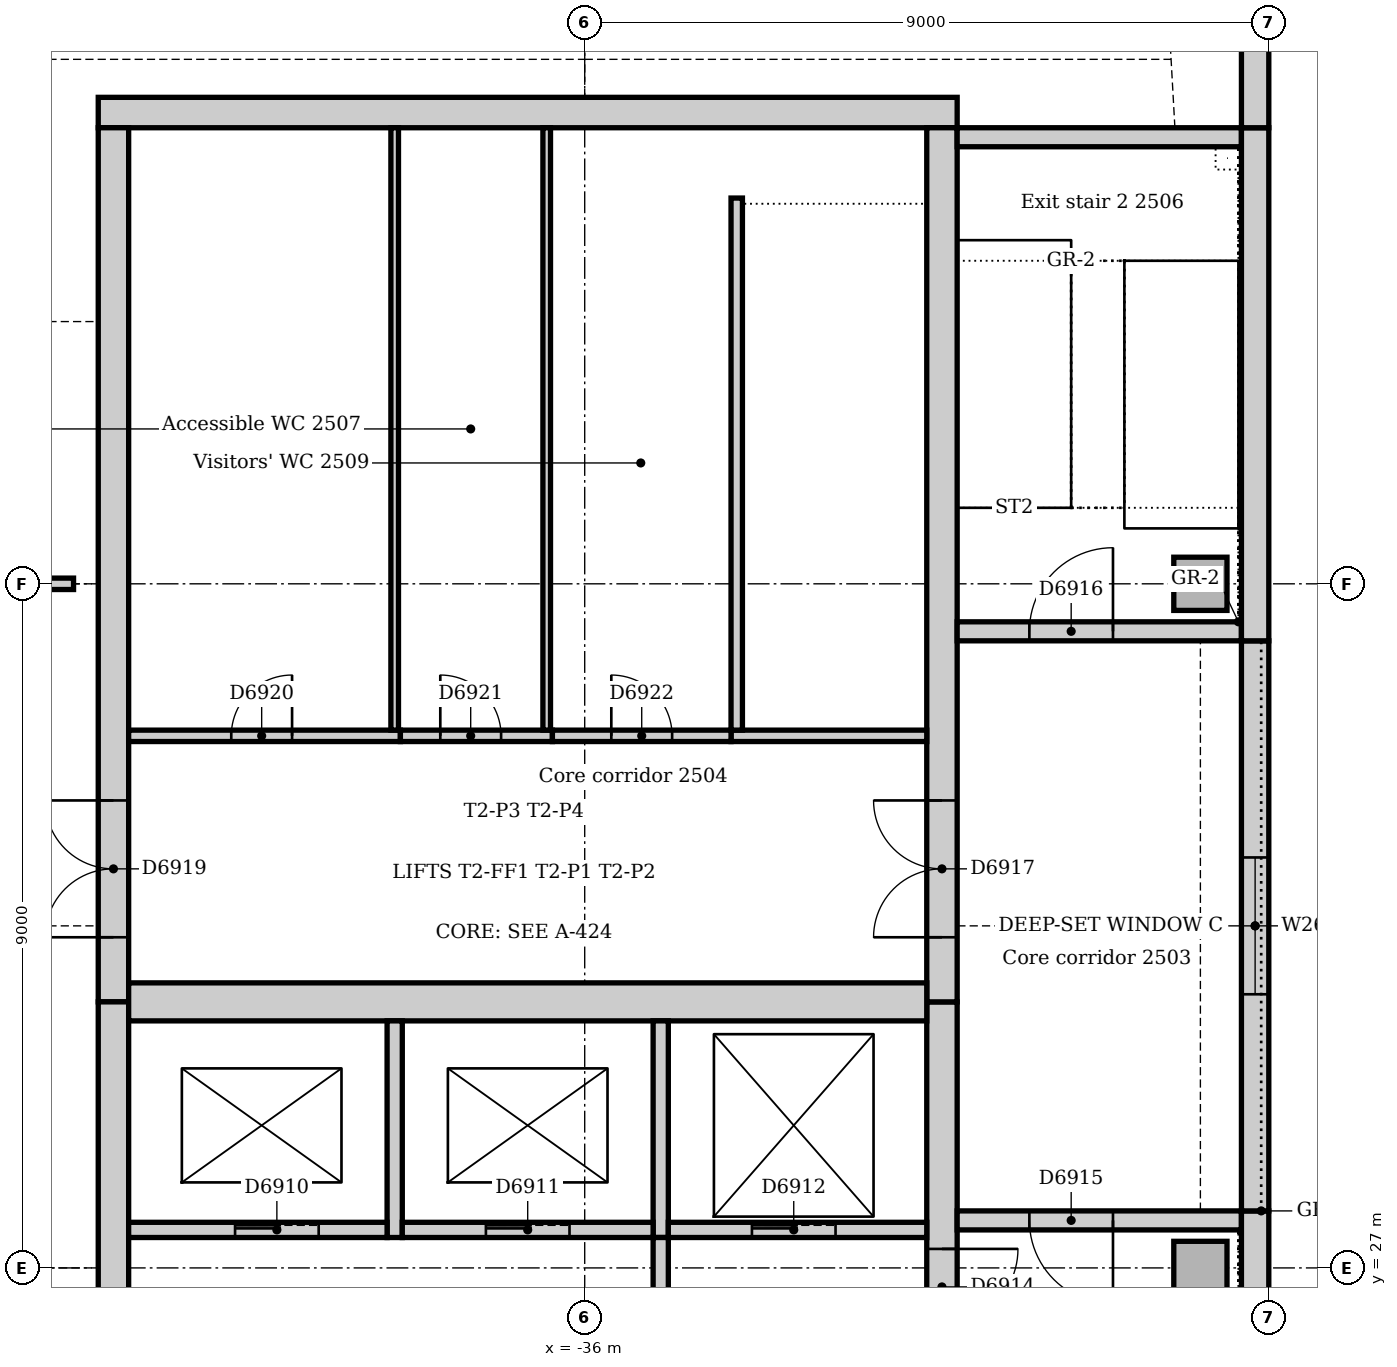
"""IFC4 building model, lengths in metres.
Left out: names, types, materials, properties, quantities, classifications, styles, units other than length and angle.
Written with IfcOpenShell. Run it as: python <this file> out.ifc"""

import sys

from ifc_helpers import new_model, si_unit, direction, frame, frame_2d, origin, origin_2d, place, context, subcontext, project, spatial, rectangle, extrude, element, fill, save


model = new_model("IFC4")
c1 = context("Model", 3, precision=1e-05, world=origin(), true_north=direction((0.0, 1.0)))
c2 = subcontext(c1, "Body", "Model", "MODEL_VIEW")
j1 = project(units=[si_unit("LENGTHUNIT", "METRE"), si_unit("PLANEANGLEUNIT", "RADIAN")], contexts=[c1])
p1 = place(None, origin())
s1 = spatial("IfcSite", under=j1, at=p1, CompositionType="ELEMENT")
p2 = place(p1, origin())
s2 = spatial("IfcBuilding", under=s1, at=p2, CompositionType="ELEMENT")
p3 = place(p2, frame((0.0, 0.0, 108.0)))
s3 = spatial("IfcBuildingStorey", under=s2, at=p3, CompositionType="ELEMENT", Elevation=108.0)
p4 = place(p3, frame((-31.1, 42.2, 0.0), z_axis=(0.0, 0.0, 1.0), x_axis=(-1.0, 0.0, 0.0)))
e1 = element("IfcWall", 1, at=p4, inside=s3, PredefinedType="SOLIDWALL", context=c2, shape_type="SweptSolid", body=[
    extrude(rectangle(XDim=11.3, YDim=0.4, at=frame_2d((5.65, 0.0))), origin(), (0.0, 0.0, 1.0), 4.0),
])
p5 = place(p3, frame((-31.3, 21.0, 0.0), z_axis=(0.0, 0.0, 1.0), x_axis=(0.0, 1.0, 0.0)))
e2 = element("IfcWall", 2, at=p5, inside=s3, PredefinedType="SOLIDWALL", context=c2, shape_type="SweptSolid", body=[
    extrude(rectangle(XDim=9.5, YDim=0.4, at=frame_2d((4.75, 0.0))), origin(), (0.0, 0.0, 1.0), 4.0),
])
p6 = place(p5, frame((5.25, 0.0, 0.0)))
e3 = element("IfcOpeningElement", 3, at=p6, cuts=e2, PredefinedType="OPENING", context=c2, shape_type="SweptSolid", body=[
    extrude(rectangle(XDim=1.0, YDim=2.1, at=frame_2d((0.5, 1.05))), frame((0.0, 0.21, 0.0), z_axis=(0.0, -1.0, 0.0), x_axis=(1.0, 0.0, 0.0)), (0.0, 0.0, 1.0), 0.42),
])
p7 = place(p3, frame((-31.3, 30.5, 0.0), z_axis=(0.0, 0.0, 1.0), x_axis=(0.0, 1.0, 0.0)))
e4 = element("IfcWall", 4, at=p7, inside=s3, PredefinedType="SOLIDWALL", context=c2, shape_type="SweptSolid", body=[
    extrude(rectangle(XDim=11.5, YDim=0.4, at=frame_2d((5.75, 0.0))), origin(), (0.0, 0.0, 1.0), 4.0),
])
p8 = place(p7, frame((0.85, 0.0, 0.0)))
e5 = element("IfcOpeningElement", 5, at=p8, cuts=e4, PredefinedType="OPENING", context=c2, shape_type="SweptSolid", body=[
    extrude(rectangle(XDim=1.8, YDim=2.1, at=frame_2d((0.9, 1.05))), frame((0.0, 0.21, 0.0), z_axis=(0.0, -1.0, 0.0), x_axis=(1.0, 0.0, 0.0)), (0.0, 0.0, 1.0), 0.42),
])
p9 = place(p3, frame((-42.2, 42.0, 0.0), z_axis=(0.0, 0.0, 1.0), x_axis=(0.0, -1.0, 0.0)))
e6 = element("IfcWall", 6, at=p9, inside=s3, PredefinedType="SOLIDWALL", context=c2, shape_type="SweptSolid", body=[
    extrude(rectangle(XDim=11.5, YDim=0.4, at=frame_2d((5.75, 0.0))), origin(), (0.0, 0.0, 1.0), 4.0),
])
p10 = place(p9, frame((8.85, 0.0, 0.0)))
e7 = element("IfcOpeningElement", 7, at=p10, cuts=e6, PredefinedType="OPENING", context=c2, shape_type="SweptSolid", body=[
    extrude(rectangle(XDim=1.8, YDim=2.1, at=frame_2d((0.9, 1.05))), frame((0.0, 0.21, 0.0), z_axis=(0.0, -1.0, 0.0), x_axis=(1.0, 0.0, 0.0)), (0.0, 0.0, 1.0), 0.42),
])
p11 = place(p3, frame((-42.2, 30.5, 0.0), z_axis=(0.0, 0.0, 1.0), x_axis=(0.0, -1.0, 0.0)))
e8 = element("IfcWall", 8, at=p11, inside=s3, PredefinedType="SOLIDWALL", context=c2, shape_type="SweptSolid", body=[
    extrude(rectangle(XDim=9.5, YDim=0.4, at=frame_2d((4.75, 0.0))), origin(), (0.0, 0.0, 1.0), 4.0),
])
p12 = place(p11, frame((3.85, 0.0, 0.0)))
e9 = element("IfcOpeningElement", 9, at=p12, cuts=e8, PredefinedType="OPENING", context=c2, shape_type="SweptSolid", body=[
    extrude(rectangle(XDim=1.8, YDim=2.1, at=frame_2d((0.9, 1.05))), frame((0.0, 0.21, 0.0), z_axis=(0.0, -1.0, 0.0), x_axis=(1.0, 0.0, 0.0)), (0.0, 0.0, 1.0), 0.42),
])
p13 = place(p3, frame((-42.0, 30.5, 0.0), z_axis=(0.0, 0.0, 1.0), x_axis=(1.0, 0.0, 0.0)))
e10 = element("IfcWall", 10, at=p13, inside=s3, PredefinedType="SOLIDWALL", context=c2, shape_type="SweptSolid", body=[
    extrude(rectangle(XDim=10.5, YDim=0.5, at=frame_2d((5.25, 0.0))), origin(), (0.0, 0.0, 1.0), 4.0),
])
p14 = place(p3, frame((-27.36, 27.625, 0.0), z_axis=(0.0, 0.0, 1.0), x_axis=(-1.0, 0.0, 0.0)))
e11 = element("IfcWall", 11, at=p14, inside=s3, PredefinedType="SOLIDWALL", context=c2, shape_type="SweptSolid", body=[
    extrude(rectangle(XDim=3.74, YDim=0.25, at=frame_2d((1.87, 0.0))), origin(), (0.0, 0.0, 1.0), 4.0),
])
p15 = place(p14, frame((1.69, 0.0, 0.0)))
e12 = element("IfcOpeningElement", 12, at=p15, cuts=e11, PredefinedType="OPENING", context=c2, shape_type="SweptSolid", body=[
    extrude(rectangle(XDim=1.1, YDim=2.1, at=frame_2d((0.55, 1.05))), frame((0.0, 0.135, 0.0), z_axis=(0.0, -1.0, 0.0), x_axis=(1.0, 0.0, 0.0)), (0.0, 0.0, 1.0), 0.27),
])
p16 = place(p3, frame((-31.1, 35.375, 0.0), z_axis=(0.0, 0.0, 1.0), x_axis=(1.0, 0.0, 0.0)))
e13 = element("IfcWall", 13, at=p16, inside=s3, PredefinedType="SOLIDWALL", context=c2, shape_type="SweptSolid", body=[
    extrude(rectangle(XDim=3.74, YDim=0.25, at=frame_2d((1.87, 0.0))), origin(), (0.0, 0.0, 1.0), 4.0),
])
p17 = place(p16, frame((0.95, 0.0, 0.0)))
e14 = element("IfcOpeningElement", 14, at=p17, cuts=e13, PredefinedType="OPENING", context=c2, shape_type="SweptSolid", body=[
    extrude(rectangle(XDim=1.1, YDim=2.1, at=frame_2d((0.55, 1.05))), frame((0.0, 0.135, 0.0), z_axis=(0.0, -1.0, 0.0), x_axis=(1.0, 0.0, 0.0)), (0.0, 0.0, 1.0), 0.27),
])
p18 = place(p3, frame((-27.36, 41.875, 0.0), z_axis=(0.0, 0.0, 1.0), x_axis=(-1.0, 0.0, 0.0)))
e15 = element("IfcWall", 15, at=p18, inside=s3, PredefinedType="SOLIDWALL", context=c2, shape_type="SweptSolid", body=[
    extrude(rectangle(XDim=3.74, YDim=0.25, at=frame_2d((1.87, 0.0))), origin(), (0.0, 0.0, 1.0), 4.0),
])
for number, where, z_axis, x_axis in (
    (16, (-27.9, 27.0, 0.0), (0.0, 0.0, 1.0), (1.0, 0.0, 0.0)),
    (17, (-27.9, 36.0, 0.0), (0.0, 0.0, 1.0), (1.0, 0.0, 0.0)),
):
    element("IfcColumn", number, at=place(p3, frame(where, z_axis=z_axis, x_axis=x_axis)), inside=s3, PredefinedType="COLUMN", context=c2, shape_type="SweptSolid", body=[
        extrude(rectangle(XDim=0.7, YDim=0.7, at=origin_2d()), origin(), (0.0, 0.0, 1.0), 4.0),
    ])
p19 = place(p3, frame((-27.18, 21.0, 0.0), z_axis=(0.0, 0.0, 1.0), x_axis=(0.0, 1.0, 0.0)))
e18 = element("IfcWall", 18, at=p19, inside=s3, PredefinedType="STANDARD", context=c2, shape_type="SweptSolid", body=[
    extrude(rectangle(XDim=6.75, YDim=0.36, at=frame_2d((3.375, 0.0))), origin(), (0.0, 0.0, 1.0), 3.85),
])
p20 = place(p3, frame((-27.18, 27.75, 0.0), z_axis=(0.0, 0.0, 1.0), x_axis=(0.0, 1.0, 0.0)))
e19 = element("IfcWall", 19, at=p20, inside=s3, PredefinedType="STANDARD", context=c2, shape_type="SweptSolid", body=[
    extrude(rectangle(XDim=7.5, YDim=0.36, at=frame_2d((3.75, 0.0))), origin(), (0.0, 0.0, 1.0), 3.85),
])
p21 = place(p20, frame((2.85, 0.0, 1.2)))
e20 = element("IfcOpeningElement", 20, at=p21, cuts=e19, PredefinedType="OPENING", context=c2, shape_type="SweptSolid", body=[
    extrude(rectangle(XDim=1.8, YDim=1.2, at=frame_2d((0.9, 0.6))), frame((0.0, 0.19, 0.0), z_axis=(0.0, -1.0, 0.0), x_axis=(1.0, 0.0, 0.0)), (0.0, 0.0, 1.0), 0.38),
])
p22 = place(p3, frame((-27.18, 35.25, 0.0), z_axis=(0.0, 0.0, 1.0), x_axis=(0.0, 1.0, 0.0)))
e21 = element("IfcWall", 21, at=p22, inside=s3, PredefinedType="STANDARD", context=c2, shape_type="SweptSolid", body=[
    extrude(rectangle(XDim=6.75, YDim=0.36, at=frame_2d((3.375, 0.0))), origin(), (0.0, 0.0, 1.0), 3.85),
])
p23 = place(p3, frame((-27.18, 42.0, 0.0), z_axis=(0.0, 0.0, 1.0), x_axis=(0.0, 1.0, 0.0)))
e22 = element("IfcWall", 22, at=p23, inside=s3, PredefinedType="STANDARD", context=c2, shape_type="SweptSolid", body=[
    extrude(rectangle(XDim=3.257, YDim=0.36, at=frame_2d((1.629, 0.0))), origin(), (0.0, 0.0, 1.0), 3.85),
])
p24 = place(p3, frame((-38.5, 27.4, 0.0), z_axis=(0.0, 0.0, 1.0), x_axis=(0.0, 1.0, 0.0)))
e23 = element("IfcWall", 23, at=p24, inside=s3, PredefinedType="SOLIDWALL", context=c2, shape_type="SweptSolid", body=[
    extrude(rectangle(XDim=2.85, YDim=0.2, at=frame_2d((1.425, 0.0))), origin(), (0.0, 0.0, 1.0), 4.0),
])
p25 = place(p3, frame((-42.0, 27.5, 0.0), z_axis=(0.0, 0.0, 1.0), x_axis=(1.0, 0.0, 0.0)))
e24 = element("IfcWall", 24, at=p25, inside=s3, PredefinedType="SOLIDWALL", context=c2, shape_type="SweptSolid", body=[
    extrude(rectangle(XDim=3.4, YDim=0.2, at=frame_2d((1.7, 0.0))), origin(), (0.0, 0.0, 1.0), 4.0),
])
p26 = place(p25, frame((1.4, 0.0, 0.0)))
e25 = element("IfcOpeningElement", 25, at=p26, cuts=e24, PredefinedType="OPENING", context=c2, shape_type="SweptSolid", body=[
    extrude(rectangle(XDim=1.1, YDim=2.1, at=frame_2d((0.55, 1.05))), frame((0.0, 0.11, 0.0), z_axis=(0.0, -1.0, 0.0), x_axis=(1.0, 0.0, 0.0)), (0.0, 0.0, 1.0), 0.22),
])
p27 = place(p3, frame((-35.0, 27.4, 0.0), z_axis=(0.0, 0.0, 1.0), x_axis=(0.0, 1.0, 0.0)))
e26 = element("IfcWall", 26, at=p27, inside=s3, PredefinedType="SOLIDWALL", context=c2, shape_type="SweptSolid", body=[
    extrude(rectangle(XDim=2.85, YDim=0.2, at=frame_2d((1.425, 0.0))), origin(), (0.0, 0.0, 1.0), 4.0),
])
p28 = place(p3, frame((-38.4, 27.5, 0.0), z_axis=(0.0, 0.0, 1.0), x_axis=(1.0, 0.0, 0.0)))
e27 = element("IfcWall", 27, at=p28, inside=s3, PredefinedType="SOLIDWALL", context=c2, shape_type="SweptSolid", body=[
    extrude(rectangle(XDim=3.3, YDim=0.2, at=frame_2d((1.65, 0.0))), origin(), (0.0, 0.0, 1.0), 4.0),
])
p29 = place(p28, frame((1.1, 0.0, 0.0)))
e28 = element("IfcOpeningElement", 28, at=p29, cuts=e27, PredefinedType="OPENING", context=c2, shape_type="SweptSolid", body=[
    extrude(rectangle(XDim=1.1, YDim=2.1, at=frame_2d((0.55, 1.05))), frame((0.0, 0.11, 0.0), z_axis=(0.0, -1.0, 0.0), x_axis=(1.0, 0.0, 0.0)), (0.0, 0.0, 1.0), 0.22),
])
p30 = place(p3, frame((-34.9, 27.5, 0.0), z_axis=(0.0, 0.0, 1.0), x_axis=(1.0, 0.0, 0.0)))
e29 = element("IfcWall", 29, at=p30, inside=s3, PredefinedType="SOLIDWALL", context=c2, shape_type="SweptSolid", body=[
    extrude(rectangle(XDim=3.4, YDim=0.2, at=frame_2d((1.7, 0.0))), origin(), (0.0, 0.0, 1.0), 4.0),
])
p31 = place(p30, frame((1.1, 0.0, 0.0)))
e30 = element("IfcOpeningElement", 30, at=p31, cuts=e29, PredefinedType="OPENING", context=c2, shape_type="SweptSolid", body=[
    extrude(rectangle(XDim=1.1, YDim=2.1, at=frame_2d((0.55, 1.05))), frame((0.0, 0.11, 0.0), z_axis=(0.0, -1.0, 0.0), x_axis=(1.0, 0.0, 0.0)), (0.0, 0.0, 1.0), 0.22),
])
p32 = place(p3, frame((-35.0, 24.1, 0.0), z_axis=(0.0, 0.0, 1.0), x_axis=(0.0, 1.0, 0.0)))
e31 = element("IfcWall", 31, at=p32, inside=s3, PredefinedType="SOLIDWALL", context=c2, shape_type="SweptSolid", body=[
    extrude(rectangle(XDim=3.3, YDim=0.2, at=frame_2d((1.65, 0.0))), origin(), (0.0, 0.0, 1.0), 4.0),
])
p33 = place(p32, frame((1.15, 0.0, 0.0)))
e32 = element("IfcOpeningElement", 32, at=p33, cuts=e31, PredefinedType="OPENING", context=c2, shape_type="SweptSolid", body=[
    extrude(rectangle(XDim=1.0, YDim=2.1, at=frame_2d((0.5, 1.05))), frame((0.0, 0.11, 0.0), z_axis=(0.0, -1.0, 0.0), x_axis=(1.0, 0.0, 0.0)), (0.0, 0.0, 1.0), 0.22),
])
p34 = place(p3, frame((-34.075, 34.0, 0.0), z_axis=(0.0, 0.0, 1.0), x_axis=(1.0, 0.0, 0.0)))
e33 = element("IfcWall", 33, at=p34, inside=s3, PredefinedType="SOLIDWALL", context=c2, shape_type="SweptSolid", body=[
    extrude(rectangle(XDim=2.575, YDim=0.15, at=frame_2d((1.288, 0.0))), origin(), (0.0, 0.0, 1.0), 4.0),
])
p35 = place(p3, frame((-34.0, 41.075, 0.0), z_axis=(0.0, 0.0, 1.0), x_axis=(0.0, -1.0, 0.0)))
e34 = element("IfcWall", 34, at=p35, inside=s3, PredefinedType="SOLIDWALL", context=c2, shape_type="SweptSolid", body=[
    extrude(rectangle(XDim=7.0, YDim=0.15, at=frame_2d((3.5, 0.0))), origin(), (0.0, 0.0, 1.0), 4.0),
])
p36 = place(p3, frame((-38.425, 34.0, 0.0), z_axis=(0.0, 0.0, 1.0), x_axis=(-1.0, 0.0, 0.0)))
e35 = element("IfcWall", 35, at=p36, inside=s3, PredefinedType="PARTITIONING", context=c2, shape_type="SweptSolid", body=[
    extrude(rectangle(XDim=3.575, YDim=0.15, at=frame_2d((1.788, 0.0))), origin(), (0.0, 0.0, 1.0), 3.85),
])
p37 = place(p36, frame((1.425, 0.0, 0.0)))
e36 = element("IfcOpeningElement", 36, at=p37, cuts=e35, PredefinedType="OPENING", context=c2, shape_type="SweptSolid", body=[
    extrude(rectangle(XDim=0.8, YDim=2.1, at=frame_2d((0.4, 1.05))), frame((0.0, 0.085, 0.0), z_axis=(0.0, -1.0, 0.0), x_axis=(1.0, 0.0, 0.0)), (0.0, 0.0, 1.0), 0.17),
])
p38 = place(p3, frame((-36.425, 34.0, 0.0), z_axis=(0.0, 0.0, 1.0), x_axis=(-1.0, 0.0, 0.0)))
e37 = element("IfcWall", 37, at=p38, inside=s3, PredefinedType="PARTITIONING", context=c2, shape_type="SweptSolid", body=[
    extrude(rectangle(XDim=2.0, YDim=0.15, at=frame_2d((1.0, 0.0))), origin(), (0.0, 0.0, 1.0), 3.85),
])
p39 = place(p38, frame((0.675, 0.0, 0.0)))
e38 = element("IfcOpeningElement", 38, at=p39, cuts=e37, PredefinedType="OPENING", context=c2, shape_type="SweptSolid", body=[
    extrude(rectangle(XDim=0.8, YDim=2.1, at=frame_2d((0.4, 1.05))), frame((0.0, 0.085, 0.0), z_axis=(0.0, -1.0, 0.0), x_axis=(1.0, 0.0, 0.0)), (0.0, 0.0, 1.0), 0.17),
])
p40 = place(p3, frame((-34.075, 34.0, 0.0), z_axis=(0.0, 0.0, 1.0), x_axis=(-1.0, 0.0, 0.0)))
e39 = element("IfcWall", 39, at=p40, inside=s3, PredefinedType="PARTITIONING", context=c2, shape_type="SweptSolid", body=[
    extrude(rectangle(XDim=2.35, YDim=0.15, at=frame_2d((1.175, 0.0))), origin(), (0.0, 0.0, 1.0), 3.85),
])
p41 = place(p40, frame((0.775, 0.0, 0.0)))
e40 = element("IfcOpeningElement", 40, at=p41, cuts=e39, PredefinedType="OPENING", context=c2, shape_type="SweptSolid", body=[
    extrude(rectangle(XDim=0.8, YDim=2.1, at=frame_2d((0.4, 1.05))), frame((0.0, 0.085, 0.0), z_axis=(0.0, -1.0, 0.0), x_axis=(1.0, 0.0, 0.0)), (0.0, 0.0, 1.0), 0.17),
])
for number, where, z_axis, x_axis in (
    (41, (-38.5, 34.075, 0.0), (0.0, 0.0, 1.0), (0.0, 1.0, 0.0)),
    (42, (-36.5, 34.075, 0.0), (0.0, 0.0, 1.0), (0.0, 1.0, 0.0)),
):
    element("IfcWall", number, at=place(p3, frame(where, z_axis=z_axis, x_axis=x_axis)), inside=s3, PredefinedType="PARTITIONING", context=c2, shape_type="SweptSolid", body=[
        extrude(rectangle(XDim=7.925, YDim=0.1, at=frame_2d((3.962, 0.0))), origin(), (0.0, 0.0, 1.0), 3.85),
    ])
p42 = place(p3, frame((-44.7, 36.0, 0.0), z_axis=(0.0, 0.0, 1.0), x_axis=(1.0, 0.0, 0.0)))
e43 = element("IfcWall", 43, at=p42, inside=s3, PredefinedType="PARTITIONING", context=c2, shape_type="SweptSolid", body=[
    extrude(rectangle(XDim=1.975, YDim=0.15, at=frame_2d((0.988, 0.0))), origin(), (0.0, 0.0, 1.0), 3.602),
])
p43 = place(p42, frame((0.55, 0.0, 0.0)))
e44 = element("IfcOpeningElement", 44, at=p43, cuts=e43, PredefinedType="OPENING", context=c2, shape_type="SweptSolid", body=[
    extrude(rectangle(XDim=0.9, YDim=2.1, at=frame_2d((0.45, 1.05))), frame((0.0, 0.085, 0.0), z_axis=(0.0, -1.0, 0.0), x_axis=(1.0, 0.0, 0.0)), (0.0, 0.0, 1.0), 0.17),
])
p44 = place(p21, origin())
e45 = element("IfcWindow", 45, at=p44, inside=s3, PartitioningType="SINGLE_PANEL", PredefinedType="WINDOW", context=c2, shape_type="SweptSolid", body=[
    extrude(rectangle(XDim=1.8, YDim=1.2, at=frame_2d((0.9, 0.6))), frame((0.0, 0.13, 0.0), z_axis=(0.0, -1.0, 0.0), x_axis=(1.0, 0.0, 0.0)), (0.0, 0.0, 1.0), 0.06),
])
fill(e20, e45)
p45 = place(p26, origin())
e46 = element("IfcDoor", 46, at=p45, inside=s3, OperationType="SLIDING_TO_LEFT", PredefinedType="DOOR", context=c2, shape_type="SweptSolid", body=[
    extrude(rectangle(XDim=1.1, YDim=2.1, at=frame_2d((0.55, 1.05))), frame((0.0, 0.025, 0.0), z_axis=(0.0, -1.0, 0.0), x_axis=(1.0, 0.0, 0.0)), (0.0, 0.0, 1.0), 0.05),
])
fill(e25, e46)
p46 = place(p29, origin())
e47 = element("IfcDoor", 47, at=p46, inside=s3, OperationType="SLIDING_TO_LEFT", PredefinedType="DOOR", context=c2, shape_type="SweptSolid", body=[
    extrude(rectangle(XDim=1.1, YDim=2.1, at=frame_2d((0.55, 1.05))), frame((0.0, 0.025, 0.0), z_axis=(0.0, -1.0, 0.0), x_axis=(1.0, 0.0, 0.0)), (0.0, 0.0, 1.0), 0.05),
])
fill(e28, e47)
p47 = place(p31, origin())
e48 = element("IfcDoor", 48, at=p47, inside=s3, OperationType="SLIDING_TO_LEFT", PredefinedType="DOOR", context=c2, shape_type="SweptSolid", body=[
    extrude(rectangle(XDim=1.1, YDim=2.1, at=frame_2d((0.55, 1.05))), frame((0.0, 0.025, 0.0), z_axis=(0.0, -1.0, 0.0), x_axis=(1.0, 0.0, 0.0)), (0.0, 0.0, 1.0), 0.05),
])
fill(e30, e48)
p48 = place(p6, frame((1.0, 0.0, 0.0), z_axis=(0.0, 0.0, 1.0), x_axis=(-1.0, 0.0, 0.0)))
e49 = element("IfcDoor", 49, at=p48, inside=s3, OperationType="SINGLE_SWING_LEFT", PredefinedType="DOOR", context=c2, shape_type="SweptSolid", body=[
    extrude(rectangle(XDim=1.0, YDim=2.1, at=frame_2d((0.5, 1.05))), frame((0.0, 0.025, 0.0), z_axis=(0.0, -1.0, 0.0), x_axis=(1.0, 0.0, 0.0)), (0.0, 0.0, 1.0), 0.05),
])
fill(e3, e49)
p49 = place(p15, origin())
e50 = element("IfcDoor", 50, at=p49, inside=s3, OperationType="SINGLE_SWING_LEFT", PredefinedType="DOOR", context=c2, shape_type="SweptSolid", body=[
    extrude(rectangle(XDim=1.1, YDim=2.1, at=frame_2d((0.55, 1.05))), frame((0.0, 0.025, 0.0), z_axis=(0.0, -1.0, 0.0), x_axis=(1.0, 0.0, 0.0)), (0.0, 0.0, 1.0), 0.05),
])
fill(e12, e50)
p50 = place(p17, origin())
e51 = element("IfcDoor", 51, at=p50, inside=s3, OperationType="SINGLE_SWING_RIGHT", PredefinedType="DOOR", context=c2, shape_type="SweptSolid", body=[
    extrude(rectangle(XDim=1.1, YDim=2.1, at=frame_2d((0.55, 1.05))), frame((0.0, 0.025, 0.0), z_axis=(0.0, -1.0, 0.0), x_axis=(1.0, 0.0, 0.0)), (0.0, 0.0, 1.0), 0.05),
])
fill(e14, e51)
p51 = place(p8, origin())
e52 = element("IfcDoor", 52, at=p51, inside=s3, OperationType="DOUBLE_DOOR_SINGLE_SWING", PredefinedType="DOOR", context=c2, shape_type="SweptSolid", body=[
    extrude(rectangle(XDim=1.8, YDim=2.1, at=frame_2d((0.9, 1.05))), frame((0.0, 0.025, 0.0), z_axis=(0.0, -1.0, 0.0), x_axis=(1.0, 0.0, 0.0)), (0.0, 0.0, 1.0), 0.05),
])
fill(e5, e52)
p52 = place(p10, frame((1.8, 0.0, 0.0), z_axis=(0.0, 0.0, 1.0), x_axis=(-1.0, 0.0, 0.0)))
e53 = element("IfcDoor", 53, at=p52, inside=s3, OperationType="DOUBLE_DOOR_SINGLE_SWING", PredefinedType="DOOR", context=c2, shape_type="SweptSolid", body=[
    extrude(rectangle(XDim=1.8, YDim=2.1, at=frame_2d((0.9, 1.05))), frame((0.0, 0.025, 0.0), z_axis=(0.0, -1.0, 0.0), x_axis=(1.0, 0.0, 0.0)), (0.0, 0.0, 1.0), 0.05),
])
fill(e7, e53)
p53 = place(p37, frame((0.8, 0.0, 0.0), z_axis=(0.0, 0.0, 1.0), x_axis=(-1.0, 0.0, 0.0)))
e54 = element("IfcDoor", 54, at=p53, inside=s3, OperationType="SINGLE_SWING_RIGHT", PredefinedType="DOOR", context=c2, shape_type="SweptSolid", body=[
    extrude(rectangle(XDim=0.8, YDim=2.1, at=frame_2d((0.4, 1.05))), frame((0.0, 0.025, 0.0), z_axis=(0.0, -1.0, 0.0), x_axis=(1.0, 0.0, 0.0)), (0.0, 0.0, 1.0), 0.05),
])
fill(e36, e54)
p54 = place(p39, frame((0.8, 0.0, 0.0), z_axis=(0.0, 0.0, 1.0), x_axis=(-1.0, 0.0, 0.0)))
e55 = element("IfcDoor", 55, at=p54, inside=s3, OperationType="SINGLE_SWING_LEFT", PredefinedType="DOOR", context=c2, shape_type="SweptSolid", body=[
    extrude(rectangle(XDim=0.8, YDim=2.1, at=frame_2d((0.4, 1.05))), frame((0.0, 0.025, 0.0), z_axis=(0.0, -1.0, 0.0), x_axis=(1.0, 0.0, 0.0)), (0.0, 0.0, 1.0), 0.05),
])
fill(e38, e55)
p55 = place(p41, frame((0.8, 0.0, 0.0), z_axis=(0.0, 0.0, 1.0), x_axis=(-1.0, 0.0, 0.0)))
e56 = element("IfcDoor", 56, at=p55, inside=s3, OperationType="SINGLE_SWING_LEFT", PredefinedType="DOOR", context=c2, shape_type="SweptSolid", body=[
    extrude(rectangle(XDim=0.8, YDim=2.1, at=frame_2d((0.4, 1.05))), frame((0.0, 0.025, 0.0), z_axis=(0.0, -1.0, 0.0), x_axis=(1.0, 0.0, 0.0)), (0.0, 0.0, 1.0), 0.05),
])
fill(e40, e56)
save(model, sys.argv[1])
